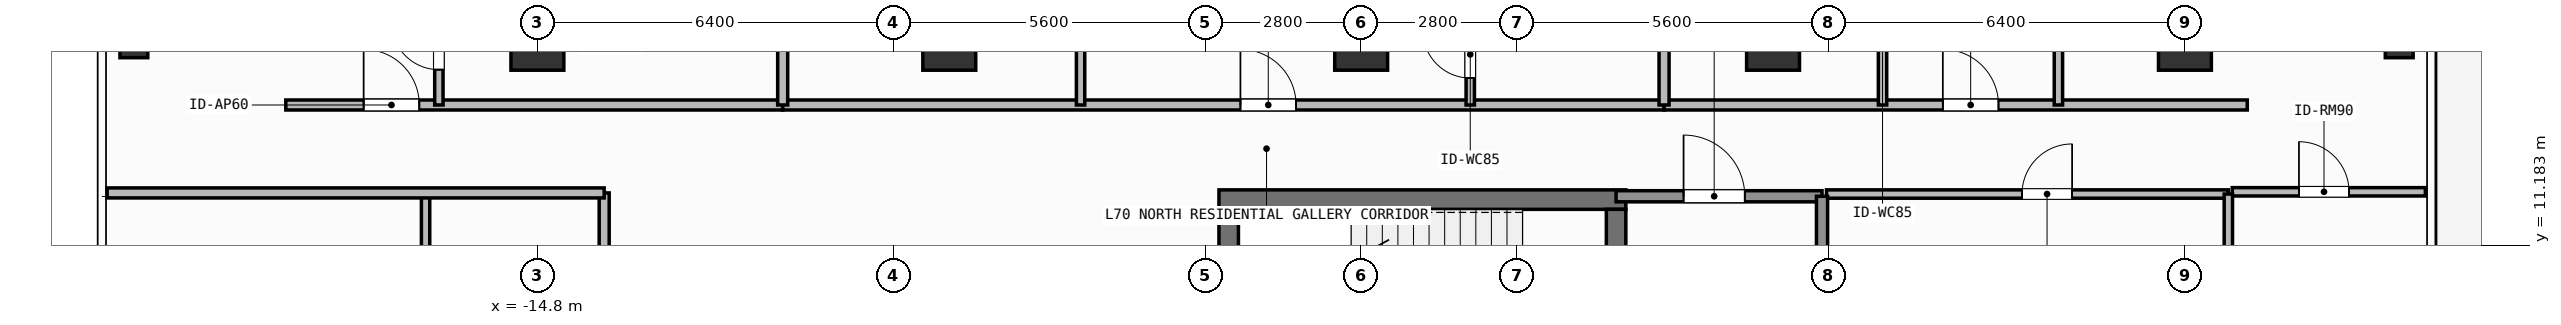
"""IFC4 building model, lengths in metres.
Left out: names, types, materials, properties, quantities, classifications, styles, units other than length and angle.
Written with IfcOpenShell. Run it as: python <this file> out.ifc"""

import sys

from ifc_helpers import new_model, si_unit, direction, frame, frame_2d, origin, origin_2d, place, context, subcontext, project, spatial, rectangle, hollow_rectangle, extrude, element, fill, save


model = new_model("IFC4")
c1 = context("Model", 3, precision=1e-05, world=origin(), true_north=direction((0.0, 1.0)))
c2 = subcontext(c1, "Body", "Model", "MODEL_VIEW")
j1 = project(units=[si_unit("LENGTHUNIT", "METRE"), si_unit("PLANEANGLEUNIT", "RADIAN")], contexts=[c1])
p1 = place(None, origin())
s1 = spatial("IfcSite", under=j1, at=p1, CompositionType="ELEMENT")
p2 = place(p1, origin())
s2 = spatial("IfcBuilding", under=s1, at=p2, CompositionType="ELEMENT")
p3 = place(p2, frame((0.0, 0.0, 285.9)))
s3 = spatial("IfcBuildingStorey", under=s2, at=p3, CompositionType="ELEMENT", Elevation=285.9)
p4 = place(p3, frame((-2.555, 12.0, 0.0), z_axis=(0.0, 0.0, 1.0), x_axis=(1.0, 0.0, 0.0)))
e1 = element("IfcWall", 1, at=p4, inside=s3, PredefinedType="SHEAR", context=c2, shape_type="SweptSolid", body=[
    extrude(rectangle(XDim=7.31, YDim=0.35, at=frame_2d((3.655, 0.0))), origin(), (0.0, 0.0, 1.0), 3.9),
])
p5 = place(p3, frame((-2.38, 8.9, 0.0), z_axis=(0.0, 0.0, 1.0), x_axis=(0.0, 1.0, 0.0)))
e2 = element("IfcWall", 2, at=p5, inside=s3, PredefinedType="SHEAR", context=c2, shape_type="SweptSolid", body=[
    extrude(rectangle(XDim=2.925, YDim=0.35, at=frame_2d((1.462, 0.0))), origin(), (0.0, 0.0, 1.0), 3.9),
])
p6 = place(p3, frame((4.58, 11.825, 0.0), z_axis=(0.0, 0.0, 1.0), x_axis=(0.0, -1.0, 0.0)))
e3 = element("IfcWall", 3, at=p6, inside=s3, PredefinedType="SHEAR", context=c2, shape_type="SweptSolid", body=[
    extrude(rectangle(XDim=2.925, YDim=0.35, at=frame_2d((1.462, 0.0))), origin(), (0.0, 0.0, 1.0), 3.9),
])
p7 = place(p6, frame((0.913, 0.0, 0.0)))
e4 = element("IfcOpeningElement", 4, at=p7, cuts=e3, PredefinedType="OPENING", context=c2, shape_type="SweptSolid", body=[
    extrude(rectangle(XDim=1.1, YDim=2.15, at=frame_2d((0.55, 1.075))), frame((0.0, 0.185, 0.0), z_axis=(0.0, -1.0, 0.0), x_axis=(1.0, 0.0, 0.0)), (0.0, 0.0, 1.0), 0.37),
])
for number, where, z_axis, x_axis in (
    (5, (-14.8, 14.8, 0.0), (0.0, 0.0, 1.0), (1.0, 0.0, 0.0)),
    (6, (-7.4, 14.8, 0.0), (0.0, 0.0, 1.0), (1.0, 0.0, 0.0)),
    (7, (0.0, 14.8, 0.0), (0.0, 0.0, 1.0), (1.0, 0.0, 0.0)),
    (8, (7.4, 14.8, 0.0), (0.0, 0.0, 1.0), (1.0, 0.0, 0.0)),
    (9, (14.8, 14.8, 0.0), (0.0, 0.0, 1.0), (1.0, 0.0, 0.0)),
):
    element("IfcColumn", number, at=place(p3, frame(where, z_axis=z_axis, x_axis=x_axis)), inside=s3, PredefinedType="COLUMN", context=c2, shape_type="SweptSolid", body=[
        extrude(rectangle(XDim=0.95, YDim=0.95, at=origin_2d()), origin(), (0.0, 0.0, 1.0), 3.9),
    ])
for number, where, z_axis, x_axis in (
    (10, (-22.05, 14.8, 0.0), (0.0, 0.0, 1.0), (1.0, 0.0, 0.0)),
    (11, (18.65, 14.8, 0.0), (0.0, 0.0, 1.0), (1.0, 0.0, 0.0)),
):
    element("IfcColumn", number, at=place(p3, frame(where, z_axis=z_axis, x_axis=x_axis)), inside=s3, PredefinedType="COLUMN", context=c2, shape_type="SweptSolid", body=[
        extrude(hollow_rectangle(XDim=0.5, YDim=0.5, WallThickness=0.025, at=origin_2d()), origin(), (0.0, 0.0, 1.0), 3.9),
    ])
p8 = place(p3, frame((4.58, 12.06, 0.0), z_axis=(0.0, 0.0, 1.0), x_axis=(1.0, 0.0, 0.0)))
e12 = element("IfcWall", 12, at=p8, inside=s3, PredefinedType="SOLIDWALL", context=c2, shape_type="SweptSolid", body=[
    extrude(rectangle(XDim=3.7, YDim=0.2, at=frame_2d((1.85, 0.0))), origin(), (0.0, 0.0, 1.0), 3.68),
])
p9 = place(p8, frame((1.212, 0.0, 0.0)))
e13 = element("IfcOpeningElement", 13, at=p9, cuts=e12, PredefinedType="OPENING", context=c2, shape_type="SweptSolid", body=[
    extrude(rectangle(XDim=1.1, YDim=2.15, at=frame_2d((0.55, 1.075))), frame((0.0, 0.11, 0.0), z_axis=(0.0, -1.0, 0.0), x_axis=(1.0, 0.0, 0.0)), (0.0, 0.0, 1.0), 0.22),
])
p10 = place(p3, frame((8.36, 12.1, 0.0), z_axis=(0.0, 0.0, 1.0), x_axis=(1.0, 0.0, 0.0)))
e14 = element("IfcWall", 14, at=p10, inside=s3, PredefinedType="PARTITIONING", context=c2, shape_type="SweptSolid", body=[
    extrude(rectangle(XDim=7.22, YDim=0.15, at=frame_2d((3.61, 0.0))), origin(), (0.0, 0.0, 1.0), 3.68),
])
p11 = place(p10, frame((3.513, 0.0, 0.0)))
e15 = element("IfcOpeningElement", 15, at=p11, cuts=e14, PredefinedType="OPENING", context=c2, shape_type="SweptSolid", body=[
    extrude(rectangle(XDim=0.9, YDim=2.1, at=frame_2d((0.45, 1.05))), frame((0.0, 0.085, 0.0), z_axis=(0.0, -1.0, 0.0), x_axis=(1.0, 0.0, 0.0)), (0.0, 0.0, 1.0), 0.17),
])
p12 = place(p3, frame((-19.32, 13.7, 0.0), z_axis=(0.0, 0.0, 1.0), x_axis=(1.0, 0.0, 0.0)))
e16 = element("IfcWall", 16, at=p12, inside=s3, PredefinedType="PARTITIONING", context=c2, shape_type="SweptSolid", body=[
    extrude(rectangle(XDim=8.927, YDim=0.18, at=frame_2d((4.463, 0.0))), origin(), (0.0, 0.0, 1.0), 3.68),
])
p13 = place(p12, frame((1.398, 0.0, 0.0)))
e17 = element("IfcOpeningElement", 17, at=p13, cuts=e16, PredefinedType="OPENING", context=c2, shape_type="SweptSolid", body=[
    extrude(rectangle(XDim=1.0, YDim=2.2, at=frame_2d((0.5, 1.1))), frame((0.0, 0.1, 0.0), z_axis=(0.0, -1.0, 0.0), x_axis=(1.0, 0.0, 0.0)), (0.0, 0.0, 1.0), 0.2),
])
p14 = place(p3, frame((-16.57, 13.7, 0.0), z_axis=(0.0, 0.0, 1.0), x_axis=(0.0, 1.0, 0.0)))
e18 = element("IfcWall", 18, at=p14, inside=s3, PredefinedType="PARTITIONING", context=c2, shape_type="SweptSolid", body=[
    extrude(rectangle(XDim=2.12, YDim=0.15, at=frame_2d((1.06, 0.0))), origin(), (0.0, 0.0, 1.0), 3.68),
])
p15 = place(p14, frame((0.635, 0.0, 0.0)))
e19 = element("IfcOpeningElement", 19, at=p15, cuts=e18, PredefinedType="OPENING", context=c2, shape_type="SweptSolid", body=[
    extrude(rectangle(XDim=0.85, YDim=2.1, at=frame_2d((0.425, 1.05))), frame((0.0, 0.085, 0.0), z_axis=(0.0, -1.0, 0.0), x_axis=(1.0, 0.0, 0.0)), (0.0, 0.0, 1.0), 0.17),
])
p16 = place(p3, frame((-10.393, 13.7, 0.0), z_axis=(0.0, 0.0, 1.0), x_axis=(1.0, 0.0, 0.0)))
e20 = element("IfcWall", 20, at=p16, inside=s3, PredefinedType="PARTITIONING", context=c2, shape_type="SweptSolid", body=[
    extrude(rectangle(XDim=15.835, YDim=0.18, at=frame_2d((7.917, 0.0))), origin(), (0.0, 0.0, 1.0), 3.68),
])
p17 = place(p16, frame((8.224, 0.0, 0.0)))
e21 = element("IfcOpeningElement", 21, at=p17, cuts=e20, PredefinedType="OPENING", context=c2, shape_type="SweptSolid", body=[
    extrude(rectangle(XDim=1.0, YDim=2.2, at=frame_2d((0.5, 1.1))), frame((0.0, 0.1, 0.0), z_axis=(0.0, -1.0, 0.0), x_axis=(1.0, 0.0, 0.0)), (0.0, 0.0, 1.0), 0.2),
])
p18 = place(p3, frame((-5.041, 13.7, 0.0), z_axis=(0.0, 0.0, 1.0), x_axis=(0.0, 1.0, 0.0)))
e22 = element("IfcWall", 22, at=p18, inside=s3, PredefinedType="PARTITIONING", context=c2, shape_type="SweptSolid", body=[
    extrude(rectangle(XDim=3.538, YDim=0.15, at=frame_2d((1.769, 0.0))), origin(), (0.0, 0.0, 1.0), 3.68),
])
p19 = place(p18, frame((1.344, 0.0, 0.0)))
e23 = element("IfcOpeningElement", 23, at=p19, cuts=e22, PredefinedType="OPENING", context=c2, shape_type="SweptSolid", body=[
    extrude(rectangle(XDim=0.85, YDim=2.1, at=frame_2d((0.425, 1.05))), frame((0.0, 0.085, 0.0), z_axis=(0.0, -1.0, 0.0), x_axis=(1.0, 0.0, 0.0)), (0.0, 0.0, 1.0), 0.17),
])
p20 = place(p3, frame((1.96, 13.7, 0.0), z_axis=(0.0, 0.0, 1.0), x_axis=(0.0, 1.0, 0.0)))
e24 = element("IfcWall", 24, at=p20, inside=s3, PredefinedType="PARTITIONING", context=c2, shape_type="SweptSolid", body=[
    extrude(rectangle(XDim=1.981, YDim=0.15, at=frame_2d((0.99, 0.0))), origin(), (0.0, 0.0, 1.0), 3.68),
])
p21 = place(p20, frame((0.484, 0.0, 0.0)))
e25 = element("IfcOpeningElement", 25, at=p21, cuts=e24, PredefinedType="OPENING", context=c2, shape_type="SweptSolid", body=[
    extrude(rectangle(XDim=0.85, YDim=2.1, at=frame_2d((0.425, 1.05))), frame((0.0, 0.085, 0.0), z_axis=(0.0, -1.0, 0.0), x_axis=(1.0, 0.0, 0.0)), (0.0, 0.0, 1.0), 0.17),
])
p22 = place(p3, frame((5.442, 13.7, 0.0), z_axis=(0.0, 0.0, 1.0), x_axis=(1.0, 0.0, 0.0)))
e26 = element("IfcWall", 26, at=p22, inside=s3, PredefinedType="PARTITIONING", context=c2, shape_type="SweptSolid", body=[
    extrude(rectangle(XDim=10.478, YDim=0.18, at=frame_2d((5.239, 0.0))), origin(), (0.0, 0.0, 1.0), 3.68),
])
p23 = place(p22, frame((5.008, 0.0, 0.0)))
e27 = element("IfcOpeningElement", 27, at=p23, cuts=e26, PredefinedType="OPENING", context=c2, shape_type="SweptSolid", body=[
    extrude(rectangle(XDim=1.0, YDim=2.2, at=frame_2d((0.5, 1.1))), frame((0.0, 0.1, 0.0), z_axis=(0.0, -1.0, 0.0), x_axis=(1.0, 0.0, 0.0)), (0.0, 0.0, 1.0), 0.2),
])
p24 = place(p3, frame((9.367, 13.7, 0.0), z_axis=(0.0, 0.0, 1.0), x_axis=(0.0, 1.0, 0.0)))
e28 = element("IfcWall", 28, at=p24, inside=s3, PredefinedType="PARTITIONING", context=c2, shape_type="SweptSolid", body=[
    extrude(rectangle(XDim=4.081, YDim=0.15, at=frame_2d((2.041, 0.0))), origin(), (0.0, 0.0, 1.0), 3.68),
])
p25 = place(p24, frame((1.53, 0.0, 0.0)))
e29 = element("IfcOpeningElement", 29, at=p25, cuts=e28, PredefinedType="OPENING", context=c2, shape_type="SweptSolid", body=[
    extrude(rectangle(XDim=0.85, YDim=2.1, at=frame_2d((0.425, 1.05))), frame((0.0, 0.085, 0.0), z_axis=(0.0, -1.0, 0.0), x_axis=(1.0, 0.0, 0.0)), (0.0, 0.0, 1.0), 0.17),
])
p26 = place(p3, frame((12.527, 13.7, 0.0), z_axis=(0.0, 0.0, 1.0), x_axis=(0.0, 1.0, 0.0)))
e30 = element("IfcWall", 30, at=p26, inside=s3, PredefinedType="PARTITIONING", context=c2, shape_type="SweptSolid", body=[
    extrude(rectangle(XDim=4.081, YDim=0.15, at=frame_2d((2.041, 0.0))), origin(), (0.0, 0.0, 1.0), 3.68),
])
p27 = place(p26, frame((1.53, 0.0, 0.0)))
e31 = element("IfcOpeningElement", 31, at=p27, cuts=e30, PredefinedType="OPENING", context=c2, shape_type="SweptSolid", body=[
    extrude(rectangle(XDim=0.85, YDim=2.1, at=frame_2d((0.425, 1.05))), frame((0.0, 0.085, 0.0), z_axis=(0.0, -1.0, 0.0), x_axis=(1.0, 0.0, 0.0)), (0.0, 0.0, 1.0), 0.17),
])
p28 = place(p3, frame((-13.6, -1.164, 0.0), z_axis=(0.0, 0.0, 1.0), x_axis=(0.0, 1.0, 0.0)))
e32 = element("IfcWall", 32, at=p28, inside=s3, PredefinedType="PARTITIONING", context=c2, shape_type="SweptSolid", body=[
    extrude(rectangle(XDim=13.284, YDim=0.18, at=frame_2d((6.642, 0.0))), origin(), (0.0, 0.0, 1.0), 3.68),
])
p29 = place(p28, frame((6.767, 0.0, 0.0)))
e33 = element("IfcOpeningElement", 33, at=p29, cuts=e32, PredefinedType="OPENING", context=c2, shape_type="SweptSolid", body=[
    extrude(rectangle(XDim=1.0, YDim=2.2, at=frame_2d((0.5, 1.1))), frame((0.0, 0.1, 0.0), z_axis=(0.0, -1.0, 0.0), x_axis=(1.0, 0.0, 0.0)), (0.0, 0.0, 1.0), 0.2),
])
p30 = place(p3, frame((15.65, 12.14, 0.0), z_axis=(0.0, 0.0, 1.0), x_axis=(1.0, 0.0, 0.0)))
e34 = element("IfcWall", 34, at=p30, inside=s3, PredefinedType="PARTITIONING", context=c2, shape_type="SweptSolid", body=[
    extrude(rectangle(XDim=3.47, YDim=0.15, at=frame_2d((1.735, 0.0))), origin(), (0.0, 0.0, 1.0), 3.68),
])
p31 = place(p30, frame((1.198, 0.0, 0.0)))
e35 = element("IfcOpeningElement", 35, at=p31, cuts=e34, PredefinedType="OPENING", context=c2, shape_type="SweptSolid", body=[
    extrude(rectangle(XDim=0.9, YDim=2.1, at=frame_2d((0.45, 1.05))), frame((0.0, 0.085, 0.0), z_axis=(0.0, -1.0, 0.0), x_axis=(1.0, 0.0, 0.0)), (0.0, 0.0, 1.0), 0.17),
])
p32 = place(p3, frame((8.28, 8.725, 0.0), z_axis=(0.0, 0.0, 1.0), x_axis=(0.0, 1.0, 0.0)))
e36 = element("IfcWall", 36, at=p32, inside=s3, PredefinedType="SOLIDWALL", context=c2, shape_type="SweptSolid", body=[
    extrude(rectangle(XDim=3.335, YDim=0.2, at=frame_2d((1.667, 0.0))), origin(), (0.0, 0.0, 1.0), 3.68),
])
p33 = place(p3, frame((15.58, 5.85, 0.0), z_axis=(0.0, 0.0, 1.0), x_axis=(0.0, 1.0, 0.0)))
e37 = element("IfcWall", 37, at=p33, inside=s3, PredefinedType="PARTITIONING", context=c2, shape_type="SweptSolid", body=[
    extrude(rectangle(XDim=6.25, YDim=0.15, at=frame_2d((3.125, 0.0))), origin(), (0.0, 0.0, 1.0), 3.68),
])
for number, where, z_axis, x_axis in (
    (38, (-10.393, 13.7, 0.0), (0.0, 0.0, 1.0), (0.0, 1.0, 0.0)),
    (39, (5.442, 13.7, 0.0), (0.0, 0.0, 1.0), (0.0, 1.0, 0.0)),
):
    element("IfcWall", number, at=place(p3, frame(where, z_axis=z_axis, x_axis=x_axis)), inside=s3, PredefinedType="PARTITIONING", context=c2, shape_type="SweptSolid", body=[
        extrude(rectangle(XDim=7.33, YDim=0.18, at=frame_2d((3.665, 0.0))), origin(), (0.0, 0.0, 1.0), 3.68),
    ])
p34 = place(p3, frame((-16.809, 9.32, 0.0), z_axis=(0.0, 0.0, 1.0), x_axis=(0.0, 1.0, 0.0)))
e40 = element("IfcWall", 40, at=p34, inside=s3, PredefinedType="PARTITIONING", context=c2, shape_type="SweptSolid", body=[
    extrude(rectangle(XDim=2.8, YDim=0.15, at=frame_2d((1.4, 0.0))), origin(), (0.0, 0.0, 1.0), 3.68),
])
p35 = place(p3, frame((-22.53, 12.12, 0.0), z_axis=(0.0, 0.0, 1.0), x_axis=(1.0, 0.0, 0.0)))
e41 = element("IfcWall", 41, at=p35, inside=s3, PredefinedType="PARTITIONING", context=c2, shape_type="SweptSolid", body=[
    extrude(rectangle(XDim=8.93, YDim=0.18, at=frame_2d((4.465, 0.0))), origin(), (0.0, 0.0, 1.0), 3.68),
])
p36 = place(p9, origin())
e42 = element("IfcDoor", 42, at=p36, inside=s3, OperationType="SINGLE_SWING_LEFT", PredefinedType="DOOR", context=c2, shape_type="SweptSolid", body=[
    extrude(rectangle(XDim=1.1, YDim=2.15, at=frame_2d((0.55, 1.075))), frame((0.0, 0.025, 0.0), z_axis=(0.0, -1.0, 0.0), x_axis=(1.0, 0.0, 0.0)), (0.0, 0.0, 1.0), 0.05),
])
fill(e13, e42)
p37 = place(p11, origin())
e43 = element("IfcDoor", 43, at=p37, inside=s3, OperationType="SINGLE_SWING_RIGHT", PredefinedType="DOOR", context=c2, shape_type="SweptSolid", body=[
    extrude(rectangle(XDim=0.9, YDim=2.1, at=frame_2d((0.45, 1.05))), frame((0.0, 0.025, 0.0), z_axis=(0.0, -1.0, 0.0), x_axis=(1.0, 0.0, 0.0)), (0.0, 0.0, 1.0), 0.05),
])
fill(e15, e43)
p38 = place(p13, origin())
e44 = element("IfcDoor", 44, at=p38, inside=s3, OperationType="SINGLE_SWING_LEFT", PredefinedType="DOOR", context=c2, shape_type="SweptSolid", body=[
    extrude(rectangle(XDim=1.0, YDim=2.2, at=frame_2d((0.5, 1.1))), frame((0.0, 0.025, 0.0), z_axis=(0.0, -1.0, 0.0), x_axis=(1.0, 0.0, 0.0)), (0.0, 0.0, 1.0), 0.05),
])
fill(e17, e44)
p39 = place(p15, origin())
e45 = element("IfcDoor", 45, at=p39, inside=s3, OperationType="SINGLE_SWING_RIGHT", PredefinedType="DOOR", context=c2, shape_type="SweptSolid", body=[
    extrude(rectangle(XDim=0.85, YDim=2.1, at=frame_2d((0.425, 1.05))), frame((0.0, 0.025, 0.0), z_axis=(0.0, -1.0, 0.0), x_axis=(1.0, 0.0, 0.0)), (0.0, 0.0, 1.0), 0.05),
])
fill(e19, e45)
p40 = place(p17, origin())
e46 = element("IfcDoor", 46, at=p40, inside=s3, OperationType="SINGLE_SWING_LEFT", PredefinedType="DOOR", context=c2, shape_type="SweptSolid", body=[
    extrude(rectangle(XDim=1.0, YDim=2.2, at=frame_2d((0.5, 1.1))), frame((0.0, 0.025, 0.0), z_axis=(0.0, -1.0, 0.0), x_axis=(1.0, 0.0, 0.0)), (0.0, 0.0, 1.0), 0.05),
])
fill(e21, e46)
p41 = place(p21, origin())
e47 = element("IfcDoor", 47, at=p41, inside=s3, OperationType="SINGLE_SWING_RIGHT", PredefinedType="DOOR", context=c2, shape_type="SweptSolid", body=[
    extrude(rectangle(XDim=0.85, YDim=2.1, at=frame_2d((0.425, 1.05))), frame((0.0, 0.025, 0.0), z_axis=(0.0, -1.0, 0.0), x_axis=(1.0, 0.0, 0.0)), (0.0, 0.0, 1.0), 0.05),
])
fill(e25, e47)
p42 = place(p23, origin())
e48 = element("IfcDoor", 48, at=p42, inside=s3, OperationType="SINGLE_SWING_LEFT", PredefinedType="DOOR", context=c2, shape_type="SweptSolid", body=[
    extrude(rectangle(XDim=1.0, YDim=2.2, at=frame_2d((0.5, 1.1))), frame((0.0, 0.025, 0.0), z_axis=(0.0, -1.0, 0.0), x_axis=(1.0, 0.0, 0.0)), (0.0, 0.0, 1.0), 0.05),
])
fill(e27, e48)
p43 = place(p31, origin())
e49 = element("IfcDoor", 49, at=p43, inside=s3, OperationType="SINGLE_SWING_LEFT", PredefinedType="DOOR", context=c2, shape_type="SweptSolid", body=[
    extrude(rectangle(XDim=0.9, YDim=2.1, at=frame_2d((0.45, 1.05))), frame((0.0, 0.025, 0.0), z_axis=(0.0, -1.0, 0.0), x_axis=(1.0, 0.0, 0.0)), (0.0, 0.0, 1.0), 0.05),
])
fill(e35, e49)
save(model, sys.argv[1])
